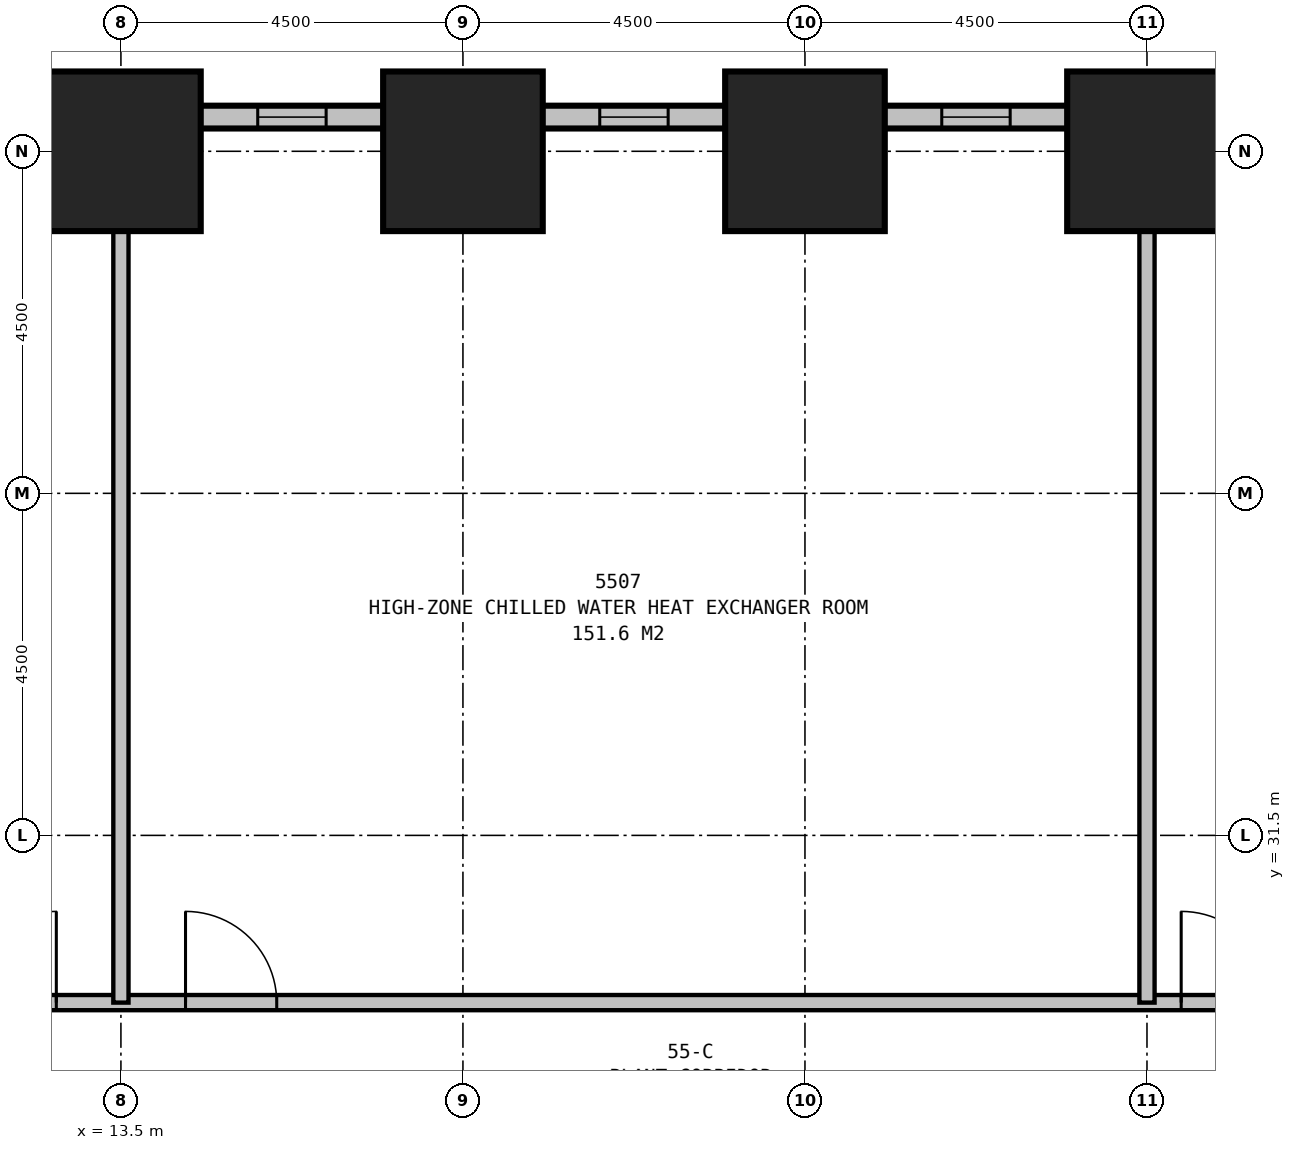
"""IFC4 building model, lengths in metres.
Left out: names, types, materials, properties, quantities, classifications, styles, units other than length and angle.
Written with IfcOpenShell. Run it as: python <this file> out.ifc"""

import sys

from ifc_helpers import new_model, si_unit, direction, frame, frame_2d, origin, origin_2d, place, context, subcontext, project, spatial, rectangle, extrude, element, fill, save


model = new_model("IFC4")
c1 = context("Model", 3, precision=1e-05, world=origin(), true_north=direction((0.0, 1.0)))
c2 = subcontext(c1, "Body", "Model", "MODEL_VIEW")
j1 = project(units=[si_unit("LENGTHUNIT", "METRE"), si_unit("PLANEANGLEUNIT", "RADIAN")], contexts=[c1])
p1 = place(None, origin())
s1 = spatial("IfcSite", under=j1, at=p1, CompositionType="ELEMENT")
p2 = place(p1, origin())
s2 = spatial("IfcBuilding", under=s1, at=p2, CompositionType="ELEMENT")
p3 = place(p2, frame((0.0, 0.0, 211.4)))
s3 = spatial("IfcBuildingStorey", under=s2, at=p3, CompositionType="ELEMENT", Elevation=211.4)
for number, where, z_axis, x_axis in (
    (1, (27.0, 40.5, 0.0), (0.0, 0.0, 1.0), (1.0, 0.0, 0.0)),
    (2, (22.5, 40.5, 0.0), (0.0, 0.0, 1.0), (1.0, 0.0, 0.0)),
    (3, (18.0, 40.5, 0.0), (0.0, 0.0, 1.0), (1.0, 0.0, 0.0)),
    (4, (13.5, 40.5, 0.0), (0.0, 0.0, 1.0), (1.0, 0.0, 0.0)),
):
    element("IfcColumn", number, at=place(p3, frame(where, z_axis=z_axis, x_axis=x_axis)), inside=s3, PredefinedType="COLUMN", context=c2, shape_type="SweptSolid", body=[
        extrude(rectangle(XDim=2.1, YDim=2.1, at=origin_2d()), origin(), (0.0, 0.0, 1.0), 6.0),
    ])
p4 = place(p3, frame((41.1, 40.95, 0.0), z_axis=(0.0, 0.0, 1.0), x_axis=(-1.0, 0.0, 0.0)))
e5 = element("IfcWall", 5, at=p4, inside=s3, PredefinedType="STANDARD", context=c2, shape_type="SweptSolid", body=[
    extrude(rectangle(XDim=32.7, YDim=0.3, at=frame_2d((16.35, 0.0))), origin(), (0.0, 0.0, 1.0), 4.6),
])
p5 = place(p4, frame((2.4, 0.0, 0.5)))
e6 = element("IfcOpeningElement", 6, at=p5, cuts=e5, PredefinedType="OPENING", context=c2, shape_type="SweptSolid", body=[
    extrude(rectangle(XDim=0.9, YDim=1.2, at=frame_2d((0.45, 0.6))), frame((0.0, 0.16, 0.0), z_axis=(0.0, -1.0, 0.0), x_axis=(1.0, 0.0, 0.0)), (0.0, 0.0, 1.0), 0.32),
])
p6 = place(p4, frame((6.9, 0.0, 0.5)))
e7 = element("IfcOpeningElement", 7, at=p6, cuts=e5, PredefinedType="OPENING", context=c2, shape_type="SweptSolid", body=[
    extrude(rectangle(XDim=0.9, YDim=1.2, at=frame_2d((0.45, 0.6))), frame((0.0, 0.16, 0.0), z_axis=(0.0, -1.0, 0.0), x_axis=(1.0, 0.0, 0.0)), (0.0, 0.0, 1.0), 0.32),
])
p7 = place(p4, frame((11.4, 0.0, 0.5)))
e8 = element("IfcOpeningElement", 8, at=p7, cuts=e5, PredefinedType="OPENING", context=c2, shape_type="SweptSolid", body=[
    extrude(rectangle(XDim=0.9, YDim=1.2, at=frame_2d((0.45, 0.6))), frame((0.0, 0.16, 0.0), z_axis=(0.0, -1.0, 0.0), x_axis=(1.0, 0.0, 0.0)), (0.0, 0.0, 1.0), 0.32),
])
p8 = place(p4, frame((15.9, 0.0, 0.5)))
e9 = element("IfcOpeningElement", 9, at=p8, cuts=e5, PredefinedType="OPENING", context=c2, shape_type="SweptSolid", body=[
    extrude(rectangle(XDim=0.9, YDim=1.2, at=frame_2d((0.45, 0.6))), frame((0.0, 0.16, 0.0), z_axis=(0.0, -1.0, 0.0), x_axis=(1.0, 0.0, 0.0)), (0.0, 0.0, 1.0), 0.32),
])
p9 = place(p4, frame((20.4, 0.0, 0.5)))
e10 = element("IfcOpeningElement", 10, at=p9, cuts=e5, PredefinedType="OPENING", context=c2, shape_type="SweptSolid", body=[
    extrude(rectangle(XDim=0.9, YDim=1.2, at=frame_2d((0.45, 0.6))), frame((0.0, 0.16, 0.0), z_axis=(0.0, -1.0, 0.0), x_axis=(1.0, 0.0, 0.0)), (0.0, 0.0, 1.0), 0.32),
])
p10 = place(p4, frame((24.9, 0.0, 0.5)))
e11 = element("IfcOpeningElement", 11, at=p10, cuts=e5, PredefinedType="OPENING", context=c2, shape_type="SweptSolid", body=[
    extrude(rectangle(XDim=0.9, YDim=1.2, at=frame_2d((0.45, 0.6))), frame((0.0, 0.16, 0.0), z_axis=(0.0, -1.0, 0.0), x_axis=(1.0, 0.0, 0.0)), (0.0, 0.0, 1.0), 0.32),
])
p11 = place(p4, frame((29.4, 0.0, 0.5)))
e12 = element("IfcOpeningElement", 12, at=p11, cuts=e5, PredefinedType="OPENING", context=c2, shape_type="SweptSolid", body=[
    extrude(rectangle(XDim=0.9, YDim=1.2, at=frame_2d((0.45, 0.6))), frame((0.0, 0.16, 0.0), z_axis=(0.0, -1.0, 0.0), x_axis=(1.0, 0.0, 0.0)), (0.0, 0.0, 1.0), 0.32),
])
p12 = place(p3, frame((11.2, 29.3, 0.0), z_axis=(0.0, 0.0, 1.0), x_axis=(1.0, 0.0, 0.0)))
e13 = element("IfcWall", 13, at=p12, inside=s3, PredefinedType="PARTITIONING", context=c2, shape_type="SweptSolid", body=[
    extrude(rectangle(XDim=27.1, YDim=0.2, at=frame_2d((13.55, 0.0))), origin(), (0.0, 0.0, 1.0), 5.75),
])
p13 = place(p12, frame((3.15, 0.0, 0.0)))
e14 = element("IfcOpeningElement", 14, at=p13, cuts=e13, PredefinedType="OPENING", context=c2, shape_type="SweptSolid", body=[
    extrude(rectangle(XDim=1.2, YDim=2.1, at=frame_2d((0.6, 1.05))), frame((0.0, 0.11, 0.0), z_axis=(0.0, -1.0, 0.0), x_axis=(1.0, 0.0, 0.0)), (0.0, 0.0, 1.0), 0.22),
])
p14 = place(p12, frame((16.25, 0.0, 0.0)))
e15 = element("IfcOpeningElement", 15, at=p14, cuts=e13, PredefinedType="OPENING", context=c2, shape_type="SweptSolid", body=[
    extrude(rectangle(XDim=1.2, YDim=2.1, at=frame_2d((0.6, 1.05))), frame((0.0, 0.11, 0.0), z_axis=(0.0, -1.0, 0.0), x_axis=(1.0, 0.0, 0.0)), (0.0, 0.0, 1.0), 0.22),
])
p15 = place(p12, frame((0.25, 0.0, 0.0)))
e16 = element("IfcOpeningElement", 16, at=p15, cuts=e13, PredefinedType="OPENING", context=c2, shape_type="SweptSolid", body=[
    extrude(rectangle(XDim=1.2, YDim=2.1, at=frame_2d((0.6, 1.05))), frame((0.0, 0.11, 0.0), z_axis=(0.0, -1.0, 0.0), x_axis=(1.0, 0.0, 0.0)), (0.0, 0.0, 1.0), 0.22),
])
p16 = place(p12, frame((25.35, 0.0, 0.0)))
e17 = element("IfcOpeningElement", 17, at=p16, cuts=e13, PredefinedType="OPENING", context=c2, shape_type="SweptSolid", body=[
    extrude(rectangle(XDim=1.2, YDim=2.1, at=frame_2d((0.6, 1.05))), frame((0.0, 0.11, 0.0), z_axis=(0.0, -1.0, 0.0), x_axis=(1.0, 0.0, 0.0)), (0.0, 0.0, 1.0), 0.22),
])
p17 = place(p3, frame((13.5, 29.3, 0.0), z_axis=(0.0, 0.0, 1.0), x_axis=(0.0, 1.0, 0.0)))
e18 = element("IfcWall", 18, at=p17, inside=s3, PredefinedType="PARTITIONING", context=c2, shape_type="SweptSolid", body=[
    extrude(rectangle(XDim=10.15, YDim=0.2, at=frame_2d((5.075, 0.0))), origin(), (0.0, 0.0, 1.0), 1.85),
])
p18 = place(p3, frame((27.0, 29.3, 0.0), z_axis=(0.0, 0.0, 1.0), x_axis=(0.0, 1.0, 0.0)))
e19 = element("IfcWall", 19, at=p18, inside=s3, PredefinedType="PARTITIONING", context=c2, shape_type="SweptSolid", body=[
    extrude(rectangle(XDim=10.15, YDim=0.2, at=frame_2d((5.075, 0.0))), origin(), (0.0, 0.0, 1.0), 4.75),
])
p19 = place(p8, origin())
e20 = element("IfcWindow", 20, at=p19, inside=s3, PartitioningType="SINGLE_PANEL", PredefinedType="USERDEFINED", context=c2, shape_type="SweptSolid", body=[
    extrude(rectangle(XDim=0.9, YDim=1.2, at=frame_2d((0.45, 0.6))), frame((0.0, 0.03, 0.0), z_axis=(0.0, -1.0, 0.0), x_axis=(1.0, 0.0, 0.0)), (0.0, 0.0, 1.0), 0.06),
])
fill(e9, e20)
p20 = place(p9, origin())
e21 = element("IfcWindow", 21, at=p20, inside=s3, PartitioningType="SINGLE_PANEL", PredefinedType="USERDEFINED", context=c2, shape_type="SweptSolid", body=[
    extrude(rectangle(XDim=0.9, YDim=1.2, at=frame_2d((0.45, 0.6))), frame((0.0, 0.03, 0.0), z_axis=(0.0, -1.0, 0.0), x_axis=(1.0, 0.0, 0.0)), (0.0, 0.0, 1.0), 0.06),
])
fill(e10, e21)
p21 = place(p10, origin())
e22 = element("IfcWindow", 22, at=p21, inside=s3, PartitioningType="SINGLE_PANEL", PredefinedType="USERDEFINED", context=c2, shape_type="SweptSolid", body=[
    extrude(rectangle(XDim=0.9, YDim=1.2, at=frame_2d((0.45, 0.6))), frame((0.0, 0.03, 0.0), z_axis=(0.0, -1.0, 0.0), x_axis=(1.0, 0.0, 0.0)), (0.0, 0.0, 1.0), 0.06),
])
fill(e11, e22)
p22 = place(p13, origin())
e23 = element("IfcDoor", 23, at=p22, inside=s3, OperationType="SINGLE_SWING_LEFT", PredefinedType="DOOR", context=c2, shape_type="SweptSolid", body=[
    extrude(rectangle(XDim=1.2, YDim=2.1, at=frame_2d((0.6, 1.05))), frame((0.0, 0.025, 0.0), z_axis=(0.0, -1.0, 0.0), x_axis=(1.0, 0.0, 0.0)), (0.0, 0.0, 1.0), 0.05),
])
fill(e14, e23)
p23 = place(p14, origin())
e24 = element("IfcDoor", 24, at=p23, inside=s3, OperationType="SINGLE_SWING_LEFT", PredefinedType="DOOR", context=c2, shape_type="SweptSolid", body=[
    extrude(rectangle(XDim=1.2, YDim=2.1, at=frame_2d((0.6, 1.05))), frame((0.0, 0.025, 0.0), z_axis=(0.0, -1.0, 0.0), x_axis=(1.0, 0.0, 0.0)), (0.0, 0.0, 1.0), 0.05),
])
fill(e15, e24)
p24 = place(p15, origin())
e25 = element("IfcDoor", 25, at=p24, inside=s3, OperationType="SINGLE_SWING_RIGHT", PredefinedType="DOOR", context=c2, shape_type="SweptSolid", body=[
    extrude(rectangle(XDim=1.2, YDim=2.1, at=frame_2d((0.6, 1.05))), frame((0.0, 0.025, 0.0), z_axis=(0.0, -1.0, 0.0), x_axis=(1.0, 0.0, 0.0)), (0.0, 0.0, 1.0), 0.05),
])
fill(e16, e25)
save(model, sys.argv[1])
